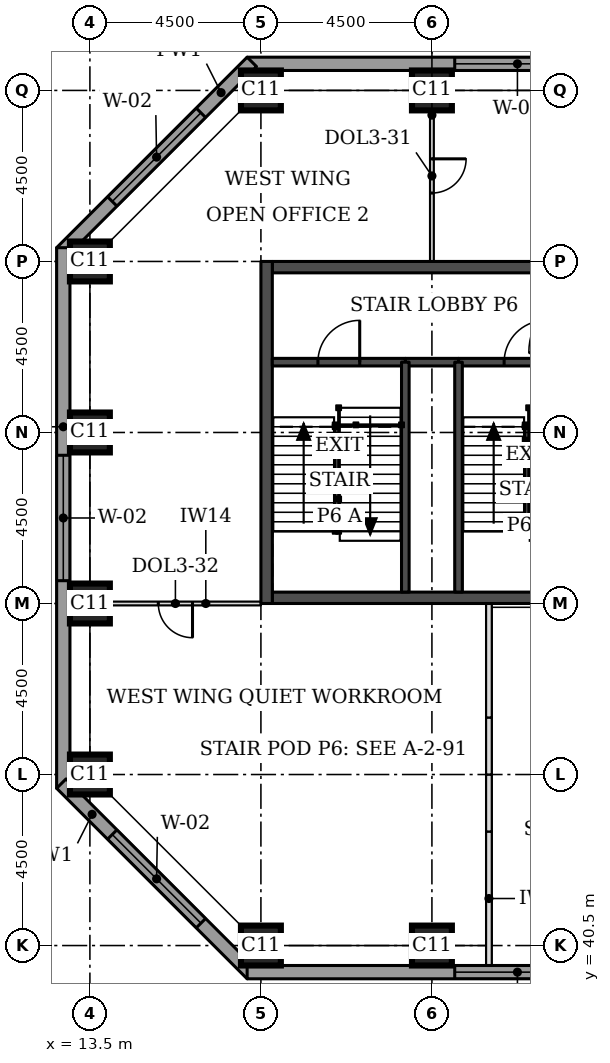
"""IFC4 building model, lengths in metres.
Left out: names, types, materials, properties, quantities, classifications, styles, units other than length and angle.
Written with IfcOpenShell. Run it as: python <this file> out.ifc"""

import sys

from ifc_helpers import new_model, si_unit, direction, frame, frame_2d, origin, origin_2d, place, context, subcontext, project, spatial, rectangle, extrude, element, fill, save


model = new_model("IFC4")
c1 = context("Model", 3, precision=1e-05, world=origin(), true_north=direction((0.0, 1.0)))
c2 = subcontext(c1, "Body", "Model", "MODEL_VIEW")
j1 = project(units=[si_unit("LENGTHUNIT", "METRE"), si_unit("PLANEANGLEUNIT", "RADIAN")], contexts=[c1])
p1 = place(None, origin())
s1 = spatial("IfcSite", under=j1, at=p1, CompositionType="ELEMENT")
p2 = place(p1, origin())
s2 = spatial("IfcBuilding", under=s1, at=p2, CompositionType="ELEMENT")
p3 = place(p2, frame((0.0, 0.0, 93.7)))
s3 = spatial("IfcBuildingStorey", under=s2, at=p3, CompositionType="ELEMENT", Elevation=93.7)
for number, where, z_axis, x_axis in (
    (1, (18.0, 40.5, 0.0), (0.0, 0.0, 1.0), (1.0, 0.0, 0.0)),
    (2, (22.5, 40.5, 0.0), (0.0, 0.0, 1.0), (1.0, 0.0, 0.0)),
    (3, (13.5, 45.0, 0.0), (0.0, 0.0, 1.0), (1.0, 0.0, 0.0)),
    (4, (13.5, 49.5, 0.0), (0.0, 0.0, 1.0), (1.0, 0.0, 0.0)),
    (5, (13.5, 54.0, 0.0), (0.0, 0.0, 1.0), (1.0, 0.0, 0.0)),
    (6, (13.5, 58.5, 0.0), (0.0, 0.0, 1.0), (1.0, 0.0, 0.0)),
    (7, (18.0, 63.0, 0.0), (0.0, 0.0, 1.0), (1.0, 0.0, 0.0)),
    (8, (22.5, 63.0, 0.0), (0.0, 0.0, 1.0), (1.0, 0.0, 0.0)),
):
    element("IfcColumn", number, at=place(p3, frame(where, z_axis=z_axis, x_axis=x_axis)), inside=s3, PredefinedType="COLUMN", context=c2, shape_type="SweptSolid", body=[
        extrude(rectangle(XDim=1.05, YDim=1.05, at=origin_2d()), origin(), (0.0, 0.0, 1.0), 3.7),
    ])
for number, where, z_axis, x_axis in (
    (9, (18.3, 49.65, 0.0), (0.0, 0.0, 1.0), (1.0, 0.0, 0.0)),
    (10, (18.3, 58.35, 0.0), (0.0, 0.0, 1.0), (1.0, 0.0, 0.0)),
):
    element("IfcWall", number, at=place(p3, frame(where, z_axis=z_axis, x_axis=x_axis)), inside=s3, PredefinedType="SHEAR", context=c2, shape_type="SweptSolid", body=[
        extrude(rectangle(XDim=8.4, YDim=0.3, at=frame_2d((4.2, 0.0))), origin(), (0.0, 0.0, 1.0), 3.7),
    ])
p4 = place(p3, frame((18.15, 49.5, 0.0), z_axis=(0.0, 0.0, 1.0), x_axis=(0.0, 1.0, 0.0)))
e11 = element("IfcWall", 11, at=p4, inside=s3, PredefinedType="SHEAR", context=c2, shape_type="SweptSolid", body=[
    extrude(rectangle(XDim=9.0, YDim=0.3, at=frame_2d((4.5, 0.0))), origin(), (0.0, 0.0, 1.0), 3.7),
])
p5 = place(p3, frame((35.475, 63.7, 0.0), z_axis=(0.0, 0.0, 1.0), x_axis=(-1.0, 0.0, 0.0)))
e12 = element("IfcWall", 12, at=p5, inside=s3, PredefinedType="STANDARD", context=c2, shape_type="SweptSolid", body=[
    extrude(rectangle(XDim=17.837, YDim=0.35, at=frame_2d((8.919, 0.0))), origin(), (0.0, 0.0, 1.0), 3.525),
])
p6 = place(p5, frame((0.5, 0.0, 0.9)))
e13 = element("IfcOpeningElement", 13, at=p6, cuts=e12, PredefinedType="OPENING", context=c2, shape_type="SweptSolid", body=[
    extrude(rectangle(XDim=3.3, YDim=1.9, at=frame_2d((1.65, 0.95))), frame((0.0, 0.185, 0.0), z_axis=(0.0, -1.0, 0.0), x_axis=(1.0, 0.0, 0.0)), (0.0, 0.0, 1.0), 0.37),
])
p7 = place(p5, frame((9.075, 0.0, 0.9)))
e14 = element("IfcOpeningElement", 14, at=p7, cuts=e12, PredefinedType="OPENING", context=c2, shape_type="SweptSolid", body=[
    extrude(rectangle(XDim=3.3, YDim=1.9, at=frame_2d((1.65, 0.95))), frame((0.0, 0.185, 0.0), z_axis=(0.0, -1.0, 0.0), x_axis=(1.0, 0.0, 0.0)), (0.0, 0.0, 1.0), 0.37),
])
p8 = place(p3, frame((17.761, 63.751, 0.0), z_axis=(0.0, 0.0, 1.0), x_axis=(-0.707106781187, -0.707106781187, 0.0)))
e15 = element("IfcWall", 15, at=p8, inside=s3, PredefinedType="STANDARD", context=c2, shape_type="SweptSolid", body=[
    extrude(rectangle(XDim=7.089, YDim=0.35, at=frame_2d((3.544, 0.0))), origin(), (0.0, 0.0, 1.0), 3.525),
])
p9 = place(p8, frame((1.894, 0.0, 0.9)))
e16 = element("IfcOpeningElement", 16, at=p9, cuts=e15, PredefinedType="OPENING", context=c2, shape_type="SweptSolid", body=[
    extrude(rectangle(XDim=3.3, YDim=1.9, at=frame_2d((1.65, 0.95))), frame((0.0, 0.185, 0.0), z_axis=(0.0, -1.0, 0.0), x_axis=(1.0, 0.0, 0.0)), (0.0, 0.0, 1.0), 0.37),
])
p10 = place(p3, frame((12.8, 58.862, 0.0), z_axis=(0.0, 0.0, 1.0), x_axis=(0.0, -1.0, 0.0)))
e17 = element("IfcWall", 17, at=p10, inside=s3, PredefinedType="STANDARD", context=c2, shape_type="SweptSolid", body=[
    extrude(rectangle(XDim=14.225, YDim=0.35, at=frame_2d((7.112, 0.0))), origin(), (0.0, 0.0, 1.0), 3.525),
])
p11 = place(p10, frame((5.462, 0.0, 0.9)))
e18 = element("IfcOpeningElement", 18, at=p11, cuts=e17, PredefinedType="OPENING", context=c2, shape_type="SweptSolid", body=[
    extrude(rectangle(XDim=3.3, YDim=1.9, at=frame_2d((1.65, 0.95))), frame((0.0, 0.185, 0.0), z_axis=(0.0, -1.0, 0.0), x_axis=(1.0, 0.0, 0.0)), (0.0, 0.0, 1.0), 0.37),
])
p12 = place(p3, frame((12.749, 44.761, 0.0), z_axis=(0.0, 0.0, 1.0), x_axis=(0.707106781187, -0.707106781187, 0.0)))
e19 = element("IfcWall", 19, at=p12, inside=s3, PredefinedType="STANDARD", context=c2, shape_type="SweptSolid", body=[
    extrude(rectangle(XDim=7.089, YDim=0.35, at=frame_2d((3.544, 0.0))), origin(), (0.0, 0.0, 1.0), 3.525),
])
p13 = place(p12, frame((1.894, 0.0, 0.9)))
e20 = element("IfcOpeningElement", 20, at=p13, cuts=e19, PredefinedType="OPENING", context=c2, shape_type="SweptSolid", body=[
    extrude(rectangle(XDim=3.3, YDim=1.9, at=frame_2d((1.65, 0.95))), frame((0.0, 0.185, 0.0), z_axis=(0.0, -1.0, 0.0), x_axis=(1.0, 0.0, 0.0)), (0.0, 0.0, 1.0), 0.37),
])
p14 = place(p3, frame((17.638, 39.8, 0.0), z_axis=(0.0, 0.0, 1.0), x_axis=(1.0, 0.0, 0.0)))
e21 = element("IfcWall", 21, at=p14, inside=s3, PredefinedType="STANDARD", context=c2, shape_type="SweptSolid", body=[
    extrude(rectangle(XDim=17.837, YDim=0.35, at=frame_2d((8.919, 0.0))), origin(), (0.0, 0.0, 1.0), 3.525),
])
p15 = place(p14, frame((5.462, 0.0, 0.9)))
e22 = element("IfcOpeningElement", 22, at=p15, cuts=e21, PredefinedType="OPENING", context=c2, shape_type="SweptSolid", body=[
    extrude(rectangle(XDim=3.3, YDim=1.9, at=frame_2d((1.65, 0.95))), frame((0.0, 0.185, 0.0), z_axis=(0.0, -1.0, 0.0), x_axis=(1.0, 0.0, 0.0)), (0.0, 0.0, 1.0), 0.37),
])
p16 = place(p14, frame((14.037, 0.0, 0.9)))
e23 = element("IfcOpeningElement", 23, at=p16, cuts=e21, PredefinedType="OPENING", context=c2, shape_type="SweptSolid", body=[
    extrude(rectangle(XDim=3.3, YDim=1.9, at=frame_2d((1.65, 0.95))), frame((0.0, 0.185, 0.0), z_axis=(0.0, -1.0, 0.0), x_axis=(1.0, 0.0, 0.0)), (0.0, 0.0, 1.0), 0.37),
])
p17 = place(p3, frame((24.0, 39.975, 0.0), z_axis=(0.0, 0.0, 1.0), x_axis=(0.0, 1.0, 0.0)))
e24 = element("IfcWall", 24, at=p17, inside=s3, PredefinedType="PARTITIONING", context=c2, shape_type="SweptSolid", body=[
    extrude(rectangle(XDim=3.525, YDim=0.15, at=frame_2d((1.762, 0.0))), origin(), (0.0, 0.0, 1.0), 3.55),
])
for number, where, z_axis, x_axis in (
    (25, (24.0, 43.5, 0.0), (0.0, 0.0, 1.0), (0.0, 1.0, 0.0)),
    (26, (24.0, 45.0, 0.0), (0.0, 0.0, 1.0), (0.0, 1.0, 0.0)),
):
    element("IfcWall", number, at=place(p3, frame(where, z_axis=z_axis, x_axis=x_axis)), inside=s3, PredefinedType="PARTITIONING", context=c2, shape_type="SweptSolid", body=[
        extrude(rectangle(XDim=1.5, YDim=0.15, at=frame_2d((0.75, 0.0))), origin(), (0.0, 0.0, 1.0), 3.55),
    ])
p18 = place(p3, frame((24.0, 46.5, 0.0), z_axis=(0.0, 0.0, 1.0), x_axis=(0.0, 1.0, 0.0)))
e27 = element("IfcWall", 27, at=p18, inside=s3, PredefinedType="PARTITIONING", context=c2, shape_type="SweptSolid", body=[
    extrude(rectangle(XDim=3.0, YDim=0.15, at=frame_2d((1.5, 0.0))), origin(), (0.0, 0.0, 1.0), 3.55),
])
p19 = place(p3, frame((22.5, 63.0, 0.0), z_axis=(0.0, 0.0, 1.0), x_axis=(0.0, -1.0, 0.0)))
e28 = element("IfcWall", 28, at=p19, inside=s3, PredefinedType="PARTITIONING", context=c2, shape_type="SweptSolid", body=[
    extrude(rectangle(XDim=4.5, YDim=0.1, at=frame_2d((2.25, 0.0))), origin(), (0.0, 0.0, 1.0), 3.55),
])
p20 = place(p19, frame((1.8, 0.0, 0.0)))
e29 = element("IfcOpeningElement", 29, at=p20, cuts=e28, PredefinedType="OPENING", context=c2, shape_type="SweptSolid", body=[
    extrude(rectangle(XDim=0.9, YDim=2.1, at=frame_2d((0.45, 1.05))), frame((0.0, 0.06, 0.0), z_axis=(0.0, -1.0, 0.0), x_axis=(1.0, 0.0, 0.0)), (0.0, 0.0, 1.0), 0.12),
])
p21 = place(p3, frame((13.5, 49.5, 0.0), z_axis=(0.0, 0.0, 1.0), x_axis=(1.0, 0.0, 0.0)))
e30 = element("IfcWall", 30, at=p21, inside=s3, PredefinedType="PARTITIONING", context=c2, shape_type="SweptSolid", body=[
    extrude(rectangle(XDim=4.5, YDim=0.1, at=frame_2d((2.25, 0.0))), origin(), (0.0, 0.0, 1.0), 3.55),
])
p22 = place(p21, frame((1.8, 0.0, 0.0)))
e31 = element("IfcOpeningElement", 31, at=p22, cuts=e30, PredefinedType="OPENING", context=c2, shape_type="SweptSolid", body=[
    extrude(rectangle(XDim=0.9, YDim=2.1, at=frame_2d((0.45, 1.05))), frame((0.0, 0.06, 0.0), z_axis=(0.0, -1.0, 0.0), x_axis=(1.0, 0.0, 0.0)), (0.0, 0.0, 1.0), 0.12),
])
p23 = place(p3, frame((21.8, 55.85, 0.0), z_axis=(0.0, 0.0, 1.0), x_axis=(1.0, 0.0, 0.0)))
e32 = element("IfcWall", 32, at=p23, inside=s3, PredefinedType="SOLIDWALL", context=c2, shape_type="SweptSolid", body=[
    extrude(rectangle(XDim=1.4, YDim=0.2, at=frame_2d((0.7, 0.0))), origin(), (0.0, 0.0, 1.0), 3.55),
])
p24 = place(p3, frame((18.3, 55.85, 0.0), z_axis=(0.0, 0.0, 1.0), x_axis=(1.0, 0.0, 0.0)))
e33 = element("IfcWall", 33, at=p24, inside=s3, PredefinedType="SOLIDWALL", context=c2, shape_type="SweptSolid", body=[
    extrude(rectangle(XDim=3.5, YDim=0.2, at=frame_2d((1.75, 0.0))), origin(), (0.0, 0.0, 1.0), 3.55),
])
p25 = place(p24, frame((1.2, 0.0, 0.0)))
e34 = element("IfcOpeningElement", 34, at=p25, cuts=e33, PredefinedType="OPENING", context=c2, shape_type="SweptSolid", body=[
    extrude(rectangle(XDim=1.1, YDim=2.1, at=frame_2d((0.55, 1.05))), frame((0.0, 0.11, 0.0), z_axis=(0.0, -1.0, 0.0), x_axis=(1.0, 0.0, 0.0)), (0.0, 0.0, 1.0), 0.22),
])
p26 = place(p3, frame((23.2, 55.85, 0.0), z_axis=(0.0, 0.0, 1.0), x_axis=(1.0, 0.0, 0.0)))
e35 = element("IfcWall", 35, at=p26, inside=s3, PredefinedType="SOLIDWALL", context=c2, shape_type="SweptSolid", body=[
    extrude(rectangle(XDim=3.5, YDim=0.2, at=frame_2d((1.75, 0.0))), origin(), (0.0, 0.0, 1.0), 3.55),
])
p27 = place(p26, frame((1.2, 0.0, 0.0)))
e36 = element("IfcOpeningElement", 36, at=p27, cuts=e35, PredefinedType="OPENING", context=c2, shape_type="SweptSolid", body=[
    extrude(rectangle(XDim=1.1, YDim=2.1, at=frame_2d((0.55, 1.05))), frame((0.0, 0.11, 0.0), z_axis=(0.0, -1.0, 0.0), x_axis=(1.0, 0.0, 0.0)), (0.0, 0.0, 1.0), 0.22),
])
for number, where, z_axis, x_axis in (
    (37, (21.8, 49.8, 0.0), (0.0, 0.0, 1.0), (0.0, 1.0, 0.0)),
    (38, (23.2, 49.8, 0.0), (0.0, 0.0, 1.0), (0.0, 1.0, 0.0)),
):
    element("IfcWall", number, at=place(p3, frame(where, z_axis=z_axis, x_axis=x_axis)), inside=s3, PredefinedType="SOLIDWALL", context=c2, shape_type="SweptSolid", body=[
        extrude(rectangle(XDim=6.05, YDim=0.2, at=frame_2d((3.025, 0.0))), origin(), (0.0, 0.0, 1.0), 3.55),
    ])
p28 = place(p7, origin())
e39 = element("IfcWindow", 39, at=p28, inside=s3, PartitioningType="SINGLE_PANEL", PredefinedType="WINDOW", context=c2, shape_type="SweptSolid", body=[
    extrude(rectangle(XDim=3.3, YDim=1.9, at=frame_2d((1.65, 0.95))), frame((0.0, 0.085, 0.0), z_axis=(0.0, -1.0, 0.0), x_axis=(1.0, 0.0, 0.0)), (0.0, 0.0, 1.0), 0.06),
])
fill(e14, e39)
p29 = place(p9, origin())
e40 = element("IfcWindow", 40, at=p29, inside=s3, PartitioningType="SINGLE_PANEL", PredefinedType="WINDOW", context=c2, shape_type="SweptSolid", body=[
    extrude(rectangle(XDim=3.3, YDim=1.9, at=frame_2d((1.65, 0.95))), frame((0.0, 0.085, 0.0), z_axis=(0.0, -1.0, 0.0), x_axis=(1.0, 0.0, 0.0)), (0.0, 0.0, 1.0), 0.06),
])
fill(e16, e40)
p30 = place(p11, origin())
e41 = element("IfcWindow", 41, at=p30, inside=s3, PartitioningType="SINGLE_PANEL", PredefinedType="WINDOW", context=c2, shape_type="SweptSolid", body=[
    extrude(rectangle(XDim=3.3, YDim=1.9, at=frame_2d((1.65, 0.95))), frame((0.0, 0.085, 0.0), z_axis=(0.0, -1.0, 0.0), x_axis=(1.0, 0.0, 0.0)), (0.0, 0.0, 1.0), 0.06),
])
fill(e18, e41)
p31 = place(p13, origin())
e42 = element("IfcWindow", 42, at=p31, inside=s3, PartitioningType="SINGLE_PANEL", PredefinedType="WINDOW", context=c2, shape_type="SweptSolid", body=[
    extrude(rectangle(XDim=3.3, YDim=1.9, at=frame_2d((1.65, 0.95))), frame((0.0, 0.085, 0.0), z_axis=(0.0, -1.0, 0.0), x_axis=(1.0, 0.0, 0.0)), (0.0, 0.0, 1.0), 0.06),
])
fill(e20, e42)
p32 = place(p15, origin())
e43 = element("IfcWindow", 43, at=p32, inside=s3, PartitioningType="SINGLE_PANEL", PredefinedType="WINDOW", context=c2, shape_type="SweptSolid", body=[
    extrude(rectangle(XDim=3.3, YDim=1.9, at=frame_2d((1.65, 0.95))), frame((0.0, 0.085, 0.0), z_axis=(0.0, -1.0, 0.0), x_axis=(1.0, 0.0, 0.0)), (0.0, 0.0, 1.0), 0.06),
])
fill(e22, e43)
p33 = place(p20, origin())
e44 = element("IfcDoor", 44, at=p33, inside=s3, OperationType="SINGLE_SWING_LEFT", PredefinedType="DOOR", context=c2, shape_type="SweptSolid", body=[
    extrude(rectangle(XDim=0.9, YDim=2.1, at=frame_2d((0.45, 1.05))), frame((0.0, 0.025, 0.0), z_axis=(0.0, -1.0, 0.0), x_axis=(1.0, 0.0, 0.0)), (0.0, 0.0, 1.0), 0.05),
])
fill(e29, e44)
p34 = place(p22, frame((0.9, 0.0, 0.0), z_axis=(0.0, 0.0, 1.0), x_axis=(-1.0, 0.0, 0.0)))
e45 = element("IfcDoor", 45, at=p34, inside=s3, OperationType="SINGLE_SWING_LEFT", PredefinedType="DOOR", context=c2, shape_type="SweptSolid", body=[
    extrude(rectangle(XDim=0.9, YDim=2.1, at=frame_2d((0.45, 1.05))), frame((0.0, 0.025, 0.0), z_axis=(0.0, -1.0, 0.0), x_axis=(1.0, 0.0, 0.0)), (0.0, 0.0, 1.0), 0.05),
])
fill(e31, e45)
p35 = place(p25, origin())
e46 = element("IfcDoor", 46, at=p35, inside=s3, OperationType="SINGLE_SWING_RIGHT", PredefinedType="DOOR", context=c2, shape_type="SweptSolid", body=[
    extrude(rectangle(XDim=1.1, YDim=2.1, at=frame_2d((0.55, 1.05))), frame((0.0, 0.025, 0.0), z_axis=(0.0, -1.0, 0.0), x_axis=(1.0, 0.0, 0.0)), (0.0, 0.0, 1.0), 0.05),
])
fill(e34, e46)
p36 = place(p27, origin())
e47 = element("IfcDoor", 47, at=p36, inside=s3, OperationType="SINGLE_SWING_RIGHT", PredefinedType="DOOR", context=c2, shape_type="SweptSolid", body=[
    extrude(rectangle(XDim=1.1, YDim=2.1, at=frame_2d((0.55, 1.05))), frame((0.0, 0.025, 0.0), z_axis=(0.0, -1.0, 0.0), x_axis=(1.0, 0.0, 0.0)), (0.0, 0.0, 1.0), 0.05),
])
fill(e36, e47)
save(model, sys.argv[1])
